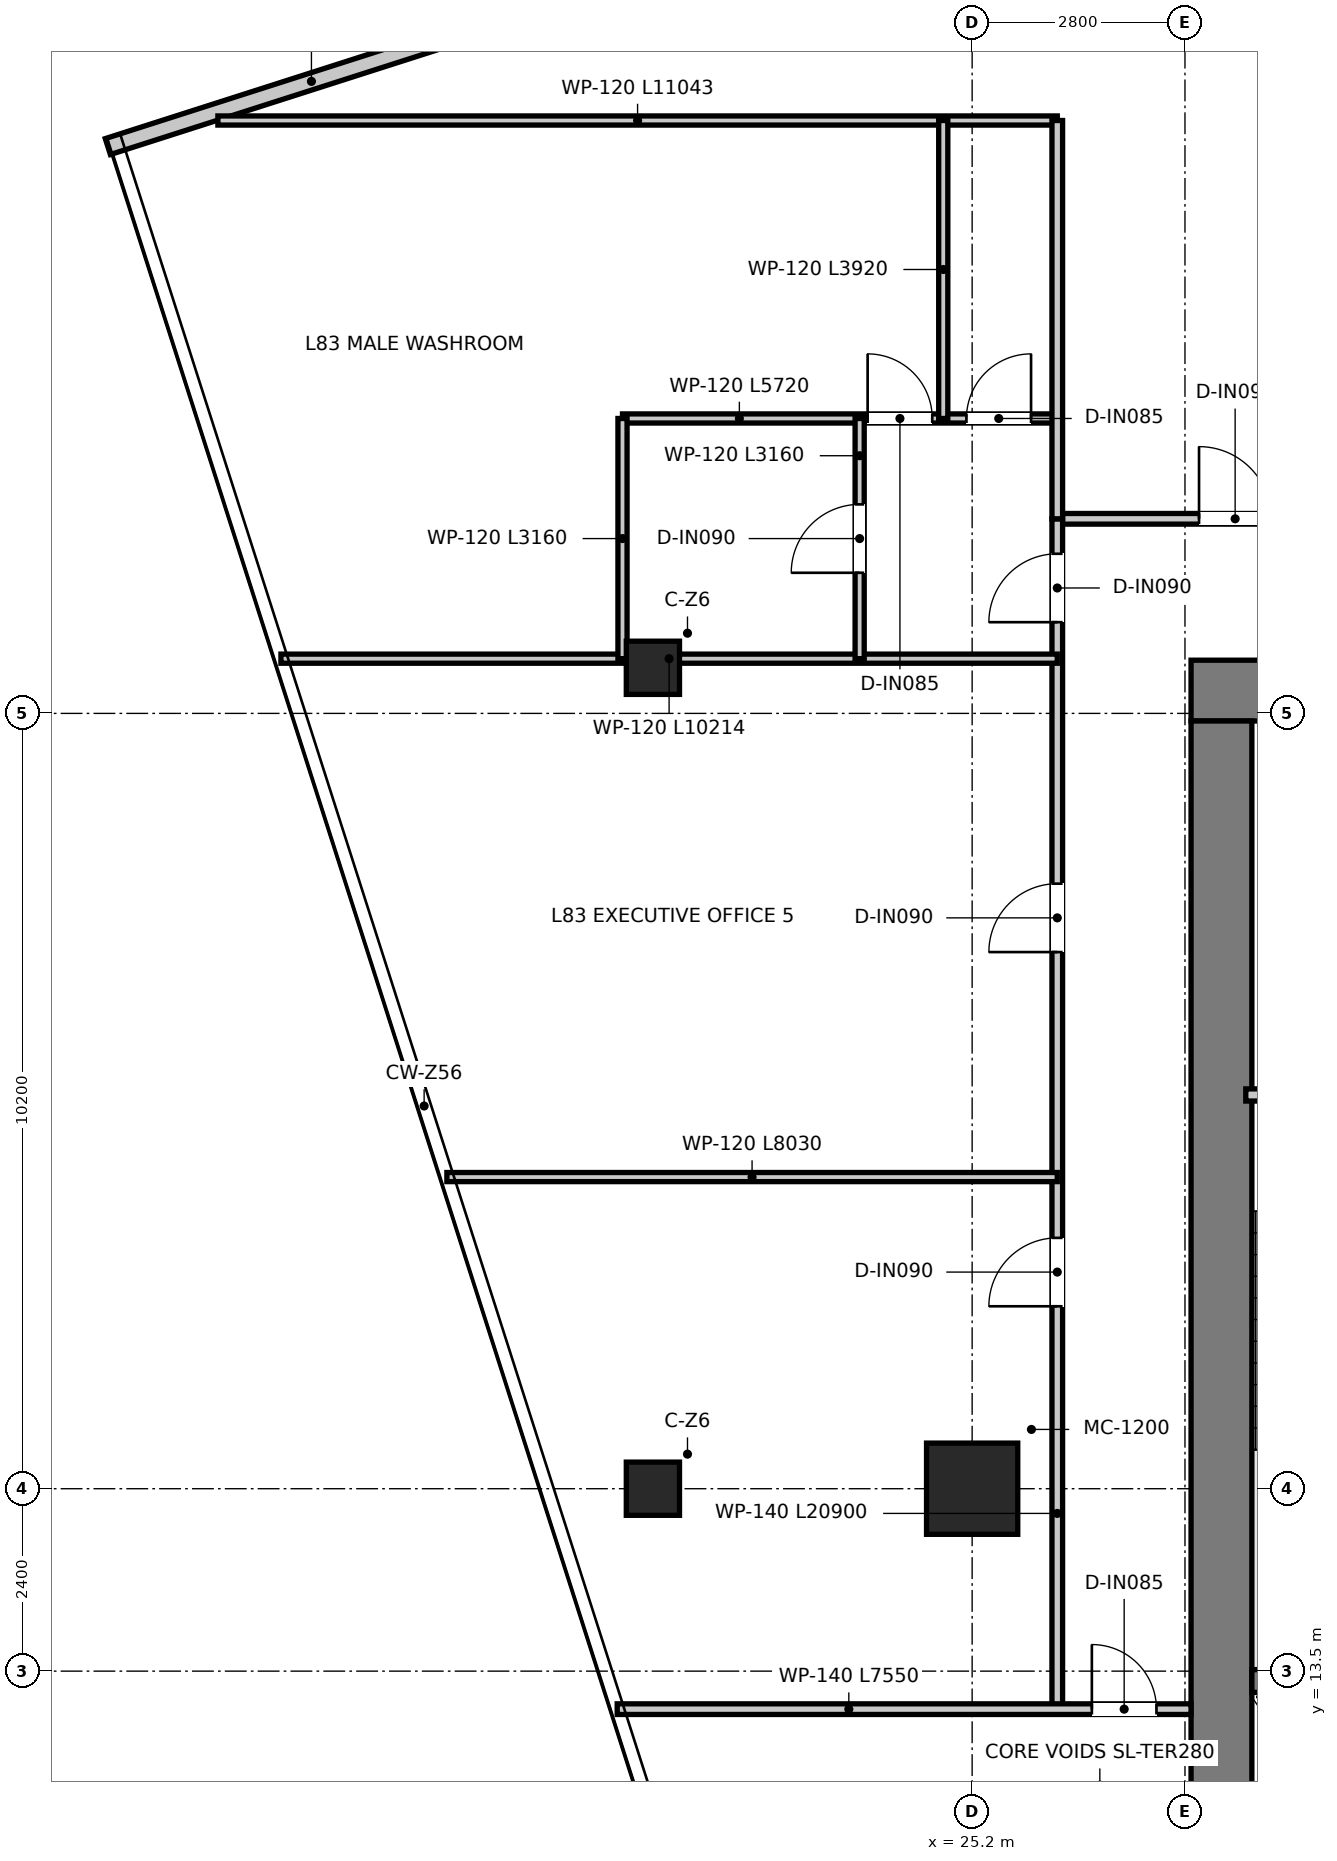
"""IFC4 building model, lengths in metres.
Left out: names, types, materials, properties, quantities, classifications, styles, units other than length and angle.
Written with IfcOpenShell. Run it as: python <this file> out.ifc"""

import sys

from ifc_helpers import new_model, si_unit, direction, frame, frame_2d, origin, origin_2d, place, context, subcontext, project, spatial, rectangle, extrude, source, transform, mapped, element, fill, save


model = new_model("IFC4")
c1 = context("Model", 3, precision=1e-05, world=origin(), true_north=direction((0.0, 1.0)))
c2 = subcontext(c1, "Body", "Model", "MODEL_VIEW")
j1 = project(units=[si_unit("LENGTHUNIT", "METRE"), si_unit("PLANEANGLEUNIT", "RADIAN")], contexts=[c1])
p1 = place(None, origin())
s1 = spatial("IfcSite", under=j1, at=p1, CompositionType="ELEMENT")
p2 = place(p1, origin())
s2 = spatial("IfcBuilding", under=s1, at=p2, CompositionType="ELEMENT")
p3 = place(p2, frame((0.0, 0.0, 339.55)))
s3 = spatial("IfcBuildingStorey", under=s2, at=p3, CompositionType="ELEMENT", Elevation=339.55)
p4 = place(p3, frame((28.08, 26.4, 0.0), z_axis=(0.0, 0.0, 1.0), x_axis=(1.0, 0.0, 0.0)))
e1 = element("IfcWall", 1, at=p4, inside=s3, PredefinedType="SHEAR", context=c2, shape_type="SweptSolid", body=[
    extrude(rectangle(XDim=15.84, YDim=0.8, at=frame_2d((7.92, 0.0))), origin(), (0.0, 0.0, 1.0), 3.95),
])
p5 = place(p4, frame((7.22, 0.0, 0.0)))
e2 = element("IfcOpeningElement", 2, at=p5, cuts=e1, PredefinedType="OPENING", context=c2, shape_type="SweptSolid", body=[
    extrude(rectangle(XDim=1.4, YDim=2.2, at=frame_2d((0.7, 1.1))), frame((0.0, 0.41, 0.0), z_axis=(0.0, -1.0, 0.0), x_axis=(1.0, 0.0, 0.0)), (0.0, 0.0, 1.0), 0.82),
])
p6 = place(p4, frame((1.775, 0.0, 0.0)))
e3 = element("IfcOpeningElement", 3, at=p6, cuts=e1, PredefinedType="OPENING", context=c2, shape_type="SweptSolid", body=[
    extrude(rectangle(XDim=1.05, YDim=2.1, at=frame_2d((0.525, 1.05))), frame((0.0, 0.41, 0.0), z_axis=(0.0, -1.0, 0.0), x_axis=(1.0, 0.0, 0.0)), (0.0, 0.0, 1.0), 0.82),
])
p7 = place(p4, frame((13.015, 0.0, 0.0)))
e4 = element("IfcOpeningElement", 4, at=p7, cuts=e1, PredefinedType="OPENING", context=c2, shape_type="SweptSolid", body=[
    extrude(rectangle(XDim=1.05, YDim=2.1, at=frame_2d((0.525, 1.05))), frame((0.0, 0.41, 0.0), z_axis=(0.0, -1.0, 0.0), x_axis=(1.0, 0.0, 0.0)), (0.0, 0.0, 1.0), 0.82),
])
p8 = place(p3, frame((28.48, 11.3, 0.0), z_axis=(0.0, 0.0, 1.0), x_axis=(0.0, 1.0, 0.0)))
e5 = element("IfcWall", 5, at=p8, inside=s3, PredefinedType="SHEAR", context=c2, shape_type="SweptSolid", body=[
    extrude(rectangle(XDim=14.7, YDim=0.8, at=frame_2d((7.35, 0.0))), origin(), (0.0, 0.0, 1.0), 3.95),
])
p9 = place(p3, frame((28.88, 13.37, 0.0), z_axis=(0.0, 0.0, 1.0), x_axis=(1.0, 0.0, 0.0)))
e6 = element("IfcWall", 6, at=p9, inside=s3, PredefinedType="SHEAR", context=c2, shape_type="SweptSolid", body=[
    extrude(rectangle(XDim=3.1, YDim=0.3, at=frame_2d((1.55, 0.0))), origin(), (0.0, 0.0, 1.0), 3.95),
])
m1 = source(origin(), c2, "Body", "SweptSolid", [
    extrude(rectangle(XDim=1.2, YDim=1.2, at=origin_2d()), origin(), (0.0, 0.0, 1.0), 3.95),
])
p10 = place(p3, frame((25.2, 15.9, 0.0), z_axis=(0.0, 0.0, 1.0), x_axis=(1.0, 0.0, 0.0)))
e7 = element("IfcColumn", 7, at=p10, inside=s3, PredefinedType="USERDEFINED", context=c2, shape_type="MappedRepresentation", body=[
    mapped(m1, transform((0.0, 0.0, 0.0), x_axis=(1.0, 0.0, 0.0), y_axis=(0.0, 1.0, 0.0), z_axis=(0.0, 0.0, 1.0), scale=1.0)),
])
m2 = source(origin(), c2, "Body", "SweptSolid", [
    extrude(rectangle(XDim=0.7, YDim=0.7, at=origin_2d()), origin(), (0.0, 0.0, 1.0), 3.95),
])
for number, where, z_axis, x_axis in (
    (8, (21.0, 15.9, 0.0), (0.0, 0.0, 1.0), (1.0, 0.0, 0.0)),
    (9, (21.0, 26.7, 0.0), (0.0, 0.0, 1.0), (1.0, 0.0, 0.0)),
):
    element("IfcColumn", number, at=place(p3, frame(where, z_axis=z_axis, x_axis=x_axis)), inside=s3, PredefinedType="COLUMN", context=c2, shape_type="MappedRepresentation", body=[
        mapped(m2, transform((0.0, 0.0, 0.0), x_axis=(1.0, 0.0, 0.0), y_axis=(0.0, 1.0, 0.0), z_axis=(0.0, 0.0, 1.0), scale=1.0)),
    ])
p11 = place(p3, frame((19.186, 35.272, 0.0), z_axis=(0.0, 0.0, 1.0), x_axis=(-0.952395921602, -0.30486391803, 0.0)))
e10 = element("IfcWall", 10, at=p11, inside=s3, PredefinedType="ELEMENTEDWALL", context=c2, shape_type="SweptSolid", body=[
    extrude(rectangle(XDim=5.625, YDim=0.22, at=frame_2d((2.812, 0.0))), origin(), (0.0, 0.0, 1.0), 3.67),
])
p12 = place(p3, frame((28.8, 21.08, 0.0), z_axis=(0.0, 0.0, 1.0), x_axis=(1.0, 0.0, 0.0)))
e11 = element("IfcWall", 11, at=p12, inside=s3, PredefinedType="PARTITIONING", context=c2, shape_type="SweptSolid", body=[
    extrude(rectangle(XDim=3.16, YDim=0.16, at=frame_2d((1.58, 0.0))), origin(), (0.0, 0.0, 1.0), 3.67),
])
p13 = place(p12, frame((1.055, 0.0, 0.0)))
e12 = element("IfcOpeningElement", 12, at=p13, cuts=e11, PredefinedType="OPENING", context=c2, shape_type="SweptSolid", body=[
    extrude(rectangle(XDim=1.05, YDim=2.1, at=frame_2d((0.525, 1.05))), frame((0.0, 0.09, 0.0), z_axis=(0.0, -1.0, 0.0), x_axis=(1.0, 0.0, 0.0)), (0.0, 0.0, 1.0), 0.18),
])
p14 = place(p3, frame((26.32, 28.66, 0.0), z_axis=(0.0, 0.0, 1.0), x_axis=(1.0, 0.0, 0.0)))
e13 = element("IfcWall", 13, at=p14, inside=s3, PredefinedType="PARTITIONING", context=c2, shape_type="SweptSolid", body=[
    extrude(rectangle(XDim=19.36, YDim=0.14, at=frame_2d((9.68, 0.0))), origin(), (0.0, 0.0, 1.0), 3.18),
])
p15 = place(p14, frame((1.865, 0.0, 0.0)))
e14 = element("IfcOpeningElement", 14, at=p15, cuts=e13, PredefinedType="OPENING", context=c2, shape_type="SweptSolid", body=[
    extrude(rectangle(XDim=0.95, YDim=2.1, at=frame_2d((0.475, 1.05))), frame((0.0, 0.08, 0.0), z_axis=(0.0, -1.0, 0.0), x_axis=(1.0, 0.0, 0.0)), (0.0, 0.0, 1.0), 0.16),
])
p16 = place(p14, frame((8.205, 0.0, 0.0)))
e15 = element("IfcOpeningElement", 15, at=p16, cuts=e13, PredefinedType="OPENING", context=c2, shape_type="SweptSolid", body=[
    extrude(rectangle(XDim=0.95, YDim=2.1, at=frame_2d((0.475, 1.05))), frame((0.0, 0.08, 0.0), z_axis=(0.0, -1.0, 0.0), x_axis=(1.0, 0.0, 0.0)), (0.0, 0.0, 1.0), 0.16),
])
p17 = place(p14, frame((15.545, 0.0, 0.0)))
e16 = element("IfcOpeningElement", 16, at=p17, cuts=e13, PredefinedType="OPENING", context=c2, shape_type="SweptSolid", body=[
    extrude(rectangle(XDim=0.95, YDim=2.1, at=frame_2d((0.475, 1.05))), frame((0.0, 0.08, 0.0), z_axis=(0.0, -1.0, 0.0), x_axis=(1.0, 0.0, 0.0)), (0.0, 0.0, 1.0), 0.16),
])
p18 = place(p3, frame((26.32, 13.0, 0.0), z_axis=(0.0, 0.0, 1.0), x_axis=(0.0, 1.0, 0.0)))
e17 = element("IfcWall", 17, at=p18, inside=s3, PredefinedType="PARTITIONING", context=c2, shape_type="SweptSolid", body=[
    extrude(rectangle(XDim=15.66, YDim=0.14, at=frame_2d((7.83, 0.0))), origin(), (0.0, 0.0, 1.0), 3.13),
])
p19 = place(p18, frame((14.3, 0.0, 0.0)))
e18 = element("IfcOpeningElement", 18, at=p19, cuts=e17, PredefinedType="OPENING", context=c2, shape_type="SweptSolid", body=[
    extrude(rectangle(XDim=0.9, YDim=2.1, at=frame_2d((0.45, 1.05))), frame((0.0, 0.08, 0.0), z_axis=(0.0, -1.0, 0.0), x_axis=(1.0, 0.0, 0.0)), (0.0, 0.0, 1.0), 0.16),
])
p20 = place(p18, frame((5.3, 0.0, 0.0)))
e19 = element("IfcOpeningElement", 19, at=p20, cuts=e17, PredefinedType="OPENING", context=c2, shape_type="SweptSolid", body=[
    extrude(rectangle(XDim=0.9, YDim=2.1, at=frame_2d((0.45, 1.05))), frame((0.0, 0.08, 0.0), z_axis=(0.0, -1.0, 0.0), x_axis=(1.0, 0.0, 0.0)), (0.0, 0.0, 1.0), 0.16),
])
p21 = place(p18, frame((9.96, 0.0, 0.0)))
e20 = element("IfcOpeningElement", 20, at=p21, cuts=e17, PredefinedType="OPENING", context=c2, shape_type="SweptSolid", body=[
    extrude(rectangle(XDim=0.9, YDim=2.1, at=frame_2d((0.45, 1.05))), frame((0.0, 0.08, 0.0), z_axis=(0.0, -1.0, 0.0), x_axis=(1.0, 0.0, 0.0)), (0.0, 0.0, 1.0), 0.16),
])
p22 = place(p3, frame((20.53, 13.0, 0.0), z_axis=(0.0, 0.0, 1.0), x_axis=(1.0, 0.0, 0.0)))
e21 = element("IfcWall", 21, at=p22, inside=s3, PredefinedType="PARTITIONING", context=c2, shape_type="SweptSolid", body=[
    extrude(rectangle(XDim=7.55, YDim=0.14, at=frame_2d((3.775, 0.0))), origin(), (0.0, 0.0, 1.0), 3.18),
])
p23 = place(p22, frame((6.245, 0.0, 0.0)))
e22 = element("IfcOpeningElement", 22, at=p23, cuts=e21, PredefinedType="OPENING", context=c2, shape_type="SweptSolid", body=[
    extrude(rectangle(XDim=0.85, YDim=2.1, at=frame_2d((0.425, 1.05))), frame((0.0, 0.08, 0.0), z_axis=(0.0, -1.0, 0.0), x_axis=(1.0, 0.0, 0.0)), (0.0, 0.0, 1.0), 0.16),
])
p24 = place(p3, frame((16.106, 26.82, 0.0), z_axis=(0.0, 0.0, 1.0), x_axis=(1.0, 0.0, 0.0)))
e23 = element("IfcWall", 23, at=p24, inside=s3, PredefinedType="PARTITIONING", context=c2, shape_type="SweptSolid", body=[
    extrude(rectangle(XDim=10.214, YDim=0.12, at=frame_2d((5.107, 0.0))), origin(), (0.0, 0.0, 1.0), 3.13),
])
p25 = place(p3, frame((15.277, 33.9, 0.0), z_axis=(0.0, 0.0, 1.0), x_axis=(1.0, 0.0, 0.0)))
e24 = element("IfcWall", 24, at=p25, inside=s3, PredefinedType="PARTITIONING", context=c2, shape_type="SweptSolid", body=[
    extrude(rectangle(XDim=11.043, YDim=0.12, at=frame_2d((5.521, 0.0))), origin(), (0.0, 0.0, 1.0), 3.13),
])
p26 = place(p3, frame((20.6, 29.98, 0.0), z_axis=(0.0, 0.0, 1.0), x_axis=(1.0, 0.0, 0.0)))
e25 = element("IfcWall", 25, at=p26, inside=s3, PredefinedType="PARTITIONING", context=c2, shape_type="SweptSolid", body=[
    extrude(rectangle(XDim=5.72, YDim=0.12, at=frame_2d((2.86, 0.0))), origin(), (0.0, 0.0, 1.0), 3.13),
])
p27 = place(p26, frame((3.225, 0.0, 0.0)))
e26 = element("IfcOpeningElement", 26, at=p27, cuts=e25, PredefinedType="OPENING", context=c2, shape_type="SweptSolid", body=[
    extrude(rectangle(XDim=0.85, YDim=2.1, at=frame_2d((0.425, 1.05))), frame((0.0, 0.07, 0.0), z_axis=(0.0, -1.0, 0.0), x_axis=(1.0, 0.0, 0.0)), (0.0, 0.0, 1.0), 0.14),
])
p28 = place(p26, frame((4.525, 0.0, 0.0)))
e27 = element("IfcOpeningElement", 27, at=p28, cuts=e25, PredefinedType="OPENING", context=c2, shape_type="SweptSolid", body=[
    extrude(rectangle(XDim=0.85, YDim=2.1, at=frame_2d((0.425, 1.05))), frame((0.0, 0.07, 0.0), z_axis=(0.0, -1.0, 0.0), x_axis=(1.0, 0.0, 0.0)), (0.0, 0.0, 1.0), 0.14),
])
p29 = place(p3, frame((20.6, 26.82, 0.0), z_axis=(0.0, 0.0, 1.0), x_axis=(0.0, 1.0, 0.0)))
e28 = element("IfcWall", 28, at=p29, inside=s3, PredefinedType="PARTITIONING", context=c2, shape_type="SweptSolid", body=[
    extrude(rectangle(XDim=3.16, YDim=0.12, at=frame_2d((1.58, 0.0))), origin(), (0.0, 0.0, 1.0), 3.67),
])
p30 = place(p3, frame((23.72, 26.82, 0.0), z_axis=(0.0, 0.0, 1.0), x_axis=(0.0, 1.0, 0.0)))
e29 = element("IfcWall", 29, at=p30, inside=s3, PredefinedType="PARTITIONING", context=c2, shape_type="SweptSolid", body=[
    extrude(rectangle(XDim=3.16, YDim=0.12, at=frame_2d((1.58, 0.0))), origin(), (0.0, 0.0, 1.0), 3.18),
])
p31 = place(p30, frame((1.13, 0.0, 0.0)))
e30 = element("IfcOpeningElement", 30, at=p31, cuts=e29, PredefinedType="OPENING", context=c2, shape_type="SweptSolid", body=[
    extrude(rectangle(XDim=0.9, YDim=2.1, at=frame_2d((0.45, 1.05))), frame((0.0, 0.07, 0.0), z_axis=(0.0, -1.0, 0.0), x_axis=(1.0, 0.0, 0.0)), (0.0, 0.0, 1.0), 0.14),
])
p32 = place(p3, frame((24.82, 29.98, 0.0), z_axis=(0.0, 0.0, 1.0), x_axis=(0.0, 1.0, 0.0)))
e31 = element("IfcWall", 31, at=p32, inside=s3, PredefinedType="PARTITIONING", context=c2, shape_type="SweptSolid", body=[
    extrude(rectangle(XDim=3.92, YDim=0.12, at=frame_2d((1.96, 0.0))), origin(), (0.0, 0.0, 1.0), 3.37),
])
p33 = place(p3, frame((26.32, 28.66, 0.0), z_axis=(0.0, 0.0, 1.0), x_axis=(0.0, 1.0, 0.0)))
e32 = element("IfcWall", 32, at=p33, inside=s3, PredefinedType="PARTITIONING", context=c2, shape_type="SweptSolid", body=[
    extrude(rectangle(XDim=5.24, YDim=0.14, at=frame_2d((2.62, 0.0))), origin(), (0.0, 0.0, 1.0), 3.43),
])
p34 = place(p3, frame((18.29, 20.0, 0.0), z_axis=(0.0, 0.0, 1.0), x_axis=(1.0, 0.0, 0.0)))
e33 = element("IfcWall", 33, at=p34, inside=s3, PredefinedType="PARTITIONING", context=c2, shape_type="SweptSolid", body=[
    extrude(rectangle(XDim=8.031, YDim=0.12, at=frame_2d((4.015, 0.0))), origin(), (0.0, 0.0, 1.0), 3.13),
])
p35 = place(p19, origin())
e34 = element("IfcDoor", 34, at=p35, inside=s3, OperationType="SINGLE_SWING_LEFT", PredefinedType="DOOR", context=c2, shape_type="SweptSolid", body=[
    extrude(rectangle(XDim=0.9, YDim=2.1, at=frame_2d((0.45, 1.05))), frame((0.0, 0.025, 0.0), z_axis=(0.0, -1.0, 0.0), x_axis=(1.0, 0.0, 0.0)), (0.0, 0.0, 1.0), 0.05),
])
fill(e18, e34)
p36 = place(p27, origin())
e35 = element("IfcDoor", 35, at=p36, inside=s3, OperationType="SINGLE_SWING_LEFT", PredefinedType="DOOR", context=c2, shape_type="SweptSolid", body=[
    extrude(rectangle(XDim=0.85, YDim=2.1, at=frame_2d((0.425, 1.05))), frame((0.0, 0.025, 0.0), z_axis=(0.0, -1.0, 0.0), x_axis=(1.0, 0.0, 0.0)), (0.0, 0.0, 1.0), 0.05),
])
fill(e26, e35)
p37 = place(p28, origin())
e36 = element("IfcDoor", 36, at=p37, inside=s3, OperationType="SINGLE_SWING_RIGHT", PredefinedType="DOOR", context=c2, shape_type="SweptSolid", body=[
    extrude(rectangle(XDim=0.85, YDim=2.1, at=frame_2d((0.425, 1.05))), frame((0.0, 0.025, 0.0), z_axis=(0.0, -1.0, 0.0), x_axis=(1.0, 0.0, 0.0)), (0.0, 0.0, 1.0), 0.05),
])
fill(e27, e36)
p38 = place(p31, origin())
e37 = element("IfcDoor", 37, at=p38, inside=s3, OperationType="SINGLE_SWING_LEFT", PredefinedType="DOOR", context=c2, shape_type="SweptSolid", body=[
    extrude(rectangle(XDim=0.9, YDim=2.1, at=frame_2d((0.45, 1.05))), frame((0.0, 0.025, 0.0), z_axis=(0.0, -1.0, 0.0), x_axis=(1.0, 0.0, 0.0)), (0.0, 0.0, 1.0), 0.05),
])
fill(e30, e37)
p39 = place(p15, origin())
e38 = element("IfcDoor", 38, at=p39, inside=s3, OperationType="SINGLE_SWING_LEFT", PredefinedType="DOOR", context=c2, shape_type="SweptSolid", body=[
    extrude(rectangle(XDim=0.95, YDim=2.1, at=frame_2d((0.475, 1.05))), frame((0.0, 0.025, 0.0), z_axis=(0.0, -1.0, 0.0), x_axis=(1.0, 0.0, 0.0)), (0.0, 0.0, 1.0), 0.05),
])
fill(e14, e38)
p40 = place(p20, origin())
e39 = element("IfcDoor", 39, at=p40, inside=s3, OperationType="SINGLE_SWING_LEFT", PredefinedType="DOOR", context=c2, shape_type="SweptSolid", body=[
    extrude(rectangle(XDim=0.9, YDim=2.1, at=frame_2d((0.45, 1.05))), frame((0.0, 0.025, 0.0), z_axis=(0.0, -1.0, 0.0), x_axis=(1.0, 0.0, 0.0)), (0.0, 0.0, 1.0), 0.05),
])
fill(e19, e39)
p41 = place(p21, origin())
e40 = element("IfcDoor", 40, at=p41, inside=s3, OperationType="SINGLE_SWING_LEFT", PredefinedType="DOOR", context=c2, shape_type="SweptSolid", body=[
    extrude(rectangle(XDim=0.9, YDim=2.1, at=frame_2d((0.45, 1.05))), frame((0.0, 0.025, 0.0), z_axis=(0.0, -1.0, 0.0), x_axis=(1.0, 0.0, 0.0)), (0.0, 0.0, 1.0), 0.05),
])
fill(e20, e40)
p42 = place(p23, origin())
e41 = element("IfcDoor", 41, at=p42, inside=s3, OperationType="SINGLE_SWING_LEFT", PredefinedType="DOOR", context=c2, shape_type="SweptSolid", body=[
    extrude(rectangle(XDim=0.85, YDim=2.1, at=frame_2d((0.425, 1.05))), frame((0.0, 0.025, 0.0), z_axis=(0.0, -1.0, 0.0), x_axis=(1.0, 0.0, 0.0)), (0.0, 0.0, 1.0), 0.05),
])
fill(e22, e41)
save(model, sys.argv[1])
